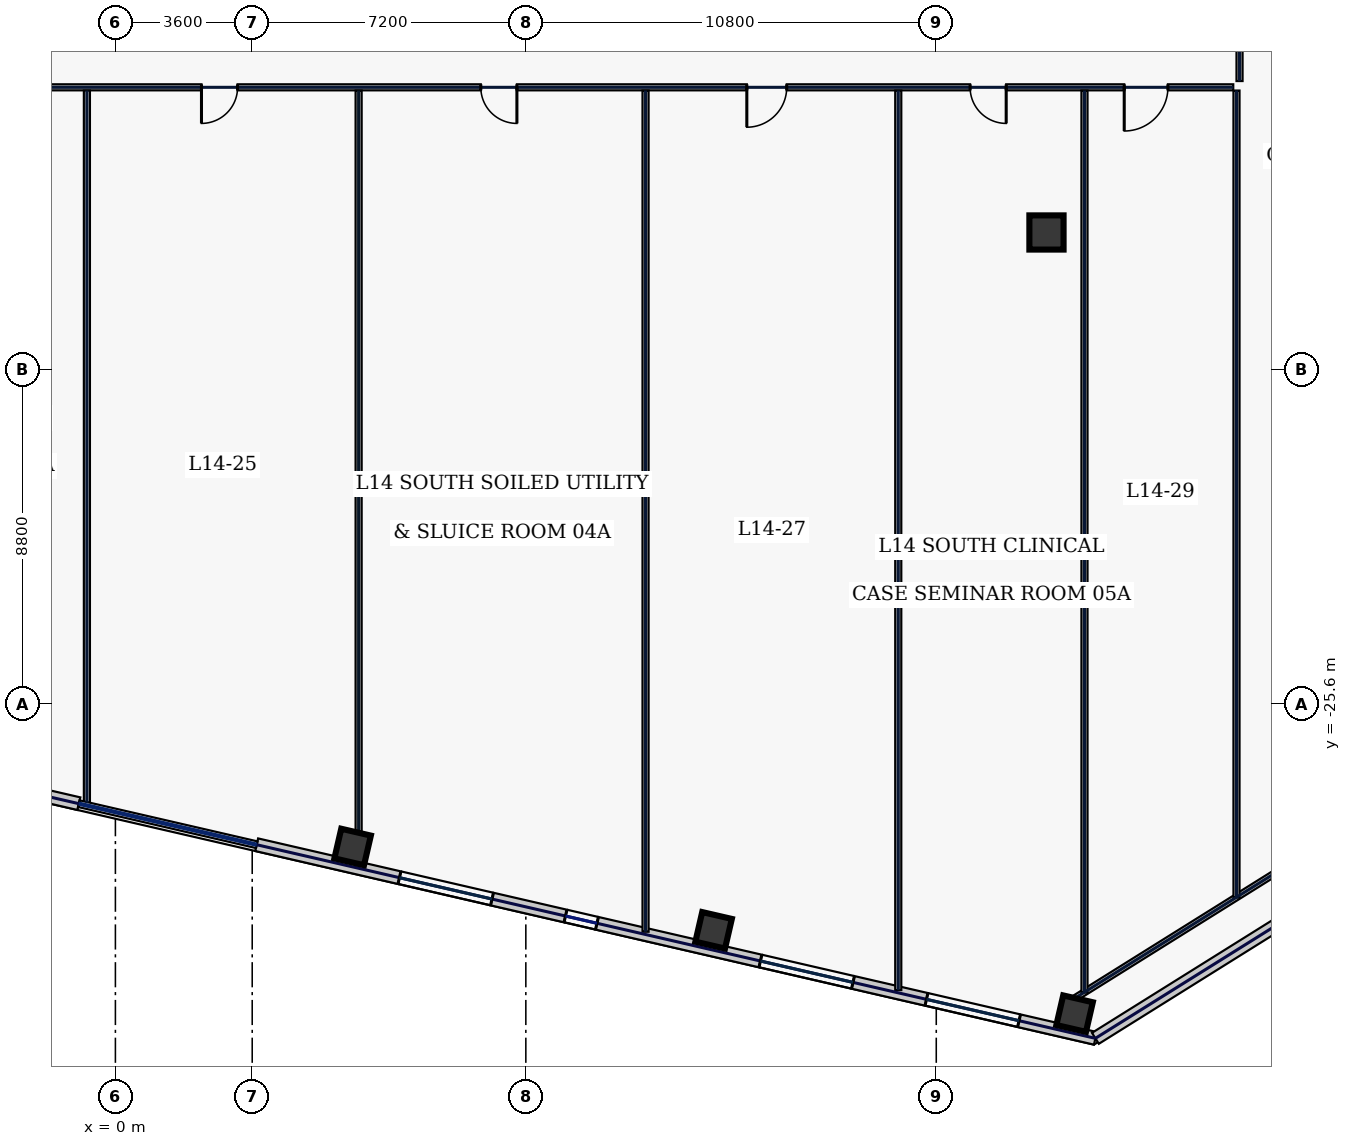
"""IFC4 building model, lengths in metres.
Left out: names, types, materials, properties, quantities, classifications, styles, units other than length and angle.
Written with IfcOpenShell. Run it as: python <this file> out.ifc"""

import sys

from ifc_helpers import new_model, si_unit, direction, frame, frame_2d, origin, origin_2d, place, context, subcontext, project, spatial, rectangle, hollow_rectangle, extrude, element, fill, save


model = new_model("IFC4")
c1 = context("Model", 3, precision=1e-05, world=origin(), true_north=direction((0.0, 1.0)))
c2 = subcontext(c1, "Body", "Model", "MODEL_VIEW")
j1 = project(units=[si_unit("LENGTHUNIT", "METRE"), si_unit("PLANEANGLEUNIT", "RADIAN")], contexts=[c1])
p1 = place(None, origin())
s1 = spatial("IfcSite", under=j1, at=p1, CompositionType="ELEMENT")
p2 = place(p1, origin())
s2 = spatial("IfcBuilding", under=s1, at=p2, CompositionType="ELEMENT")
p3 = place(p2, frame((0.0, 0.0, 67.4)))
s3 = spatial("IfcBuildingStorey", under=s2, at=p3, CompositionType="ELEMENT", Elevation=67.4)
p4 = place(p3, frame((24.5, -13.2, 0.0), z_axis=(0.0, 0.0, 1.0), x_axis=(1.0, 0.0, 0.0)))
e1 = element("IfcColumn", 1, at=p4, inside=s3, PredefinedType="COLUMN", context=c2, shape_type="SweptSolid", body=[
    extrude(hollow_rectangle(XDim=0.9, YDim=0.9, WallThickness=0.04, at=origin_2d()), origin(), (0.0, 0.0, 1.0), 3.74),
])
for number, where, z_axis, x_axis in (
    (2, (6.242, -29.371, 0.0), (0.0, 0.0, 1.0), (0.974, -0.225, 0.0)),
    (3, (15.741, -31.564, 0.0), (0.0, 0.0, 1.0), (0.974, -0.225, 0.0)),
    (4, (25.24, -33.757, 0.0), (0.0, 0.0, 1.0), (0.974, -0.225, 0.0)),
):
    element("IfcColumn", number, at=place(p3, frame(where, z_axis=z_axis, x_axis=x_axis)), inside=s3, PredefinedType="COLUMN", context=c2, shape_type="SweptSolid", body=[
        extrude(hollow_rectangle(XDim=0.8, YDim=0.8, WallThickness=0.036, at=origin_2d()), origin(), (0.0, 0.0, 1.0), 3.74),
    ])
p5 = place(p3, frame((-15.281, -24.925, 0.0), z_axis=(0.0, 0.0, 1.0), x_axis=(0.974370193991, -0.22495049469, 0.0)))
e5 = element("IfcWall", 5, at=p5, inside=s3, PredefinedType="STANDARD", context=c2, shape_type="SweptSolid", body=[
    extrude(rectangle(XDim=14.697, YDim=0.34, at=frame_2d((7.349, 0.0))), origin(), (0.0, 0.0, 1.0), 3.74),
])
p6 = place(p5, frame((4.306, 0.0, 0.22)))
e6 = element("IfcOpeningElement", 6, at=p6, cuts=e5, PredefinedType="OPENING", context=c2, shape_type="SweptSolid", body=[
    extrude(rectangle(XDim=1.6, YDim=1.2, at=frame_2d((0.8, 0.6))), frame((0.0, 0.18, 0.0), z_axis=(0.0, -1.0, 0.0), x_axis=(1.0, 0.0, 0.0)), (0.0, 0.0, 1.0), 0.36),
])
p7 = place(p5, frame((8.341, 0.0, 0.72)))
e7 = element("IfcOpeningElement", 7, at=p7, cuts=e5, PredefinedType="OPENING", context=c2, shape_type="SweptSolid", body=[
    extrude(rectangle(XDim=2.5, YDim=2.15, at=frame_2d((1.25, 1.075))), frame((0.0, 0.18, 0.0), z_axis=(0.0, -1.0, 0.0), x_axis=(1.0, 0.0, 0.0)), (0.0, 0.0, 1.0), 0.36),
])
p8 = place(p3, frame((3.717, -29.311, 0.0), z_axis=(0.0, 0.0, 1.0), x_axis=(0.97436993772, -0.224951604723, 0.0)))
e8 = element("IfcWall", 8, at=p8, inside=s3, PredefinedType="STANDARD", context=c2, shape_type="SweptSolid", body=[
    extrude(rectangle(XDim=22.651, YDim=0.34, at=frame_2d((11.326, 0.0))), origin(), (0.0, 0.0, 1.0), 3.74),
])
p9 = place(p8, frame((3.856, 0.0, 0.72)))
e9 = element("IfcOpeningElement", 9, at=p9, cuts=e8, PredefinedType="OPENING", context=c2, shape_type="SweptSolid", body=[
    extrude(rectangle(XDim=2.5, YDim=2.15, at=frame_2d((1.25, 1.075))), frame((0.0, 0.18, 0.0), z_axis=(0.0, -1.0, 0.0), x_axis=(1.0, 0.0, 0.0)), (0.0, 0.0, 1.0), 0.36),
])
p10 = place(p8, frame((8.341, 0.0, 0.72)))
e10 = element("IfcOpeningElement", 10, at=p10, cuts=e8, PredefinedType="OPENING", context=c2, shape_type="SweptSolid", body=[
    extrude(rectangle(XDim=0.85, YDim=1.85, at=frame_2d((0.425, 0.925))), frame((0.0, 0.18, 0.0), z_axis=(0.0, -1.0, 0.0), x_axis=(1.0, 0.0, 0.0)), (0.0, 0.0, 1.0), 0.36),
])
p11 = place(p8, frame((13.605, 0.0, 0.72)))
e11 = element("IfcOpeningElement", 11, at=p11, cuts=e8, PredefinedType="OPENING", context=c2, shape_type="SweptSolid", body=[
    extrude(rectangle(XDim=2.5, YDim=2.15, at=frame_2d((1.25, 1.075))), frame((0.0, 0.18, 0.0), z_axis=(0.0, -1.0, 0.0), x_axis=(1.0, 0.0, 0.0)), (0.0, 0.0, 1.0), 0.36),
])
p12 = place(p8, frame((18.089, 0.0, 0.72)))
e12 = element("IfcOpeningElement", 12, at=p12, cuts=e8, PredefinedType="OPENING", context=c2, shape_type="SweptSolid", body=[
    extrude(rectangle(XDim=2.5, YDim=2.15, at=frame_2d((1.25, 1.075))), frame((0.0, 0.18, 0.0), z_axis=(0.0, -1.0, 0.0), x_axis=(1.0, 0.0, 0.0)), (0.0, 0.0, 1.0), 0.36),
])
p13 = place(p3, frame((25.788, -34.406, 0.0), z_axis=(0.0, 0.0, 1.0), x_axis=(0.848046504656, 0.529921811158, 0.0)))
e13 = element("IfcWall", 13, at=p13, inside=s3, PredefinedType="STANDARD", context=c2, shape_type="SweptSolid", body=[
    extrude(rectangle(XDim=7.113, YDim=0.34, at=frame_2d((3.557, 0.0))), origin(), (0.0, 0.0, 1.0), 3.74),
])
p14 = place(p3, frame((25.06, -33.468, 0.0), z_axis=(0.0, 0.0, 1.0), x_axis=(0.848043064089, 0.529927317139, 0.0)))
e14 = element("IfcWall", 14, at=p14, inside=s3, PredefinedType="PARTITIONING", context=c2, shape_type="SweptSolid", body=[
    extrude(rectangle(XDim=7.354, YDim=0.16, at=frame_2d((3.677, 0.0))), origin(), (0.0, 0.0, 1.0), 3.74),
])
p15 = place(p3, frame((29.58, 9.415, 0.0), z_axis=(0.0, 0.0, 1.0), x_axis=(0.0, -1.0, 0.0)))
e15 = element("IfcWall", 15, at=p15, inside=s3, PredefinedType="PARTITIONING", context=c2, shape_type="SweptSolid", body=[
    extrude(rectangle(XDim=18.63, YDim=0.16, at=frame_2d((9.315, 0.0))), origin(), (0.0, 0.0, 1.0), 3.74),
])
p16 = place(p15, frame((16.081, 0.0, 0.0)))
e16 = element("IfcOpeningElement", 16, at=p16, cuts=e15, PredefinedType="OPENING", context=c2, shape_type="SweptSolid", body=[
    extrude(rectangle(XDim=0.95, YDim=2.2, at=frame_2d((0.475, 1.1))), frame((0.0, 0.09, 0.0), z_axis=(0.0, -1.0, 0.0), x_axis=(1.0, 0.0, 0.0)), (0.0, 0.0, 1.0), 0.18),
])
p17 = place(p15, frame((11.0, 0.0, 0.0)))
e17 = element("IfcOpeningElement", 17, at=p17, cuts=e15, PredefinedType="OPENING", context=c2, shape_type="SweptSolid", body=[
    extrude(rectangle(XDim=0.95, YDim=2.2, at=frame_2d((0.475, 1.1))), frame((0.0, 0.09, 0.0), z_axis=(0.0, -1.0, 0.0), x_axis=(1.0, 0.0, 0.0)), (0.0, 0.0, 1.0), 0.18),
])
p18 = place(p15, frame((5.8, 0.0, 0.0)))
e18 = element("IfcOpeningElement", 18, at=p18, cuts=e15, PredefinedType="OPENING", context=c2, shape_type="SweptSolid", body=[
    extrude(rectangle(XDim=0.95, YDim=2.2, at=frame_2d((0.475, 1.1))), frame((0.0, 0.09, 0.0), z_axis=(0.0, -1.0, 0.0), x_axis=(1.0, 0.0, 0.0)), (0.0, 0.0, 1.0), 0.18),
])
p19 = place(p15, frame((1.869, 0.0, 0.0)))
e19 = element("IfcOpeningElement", 19, at=p19, cuts=e15, PredefinedType="OPENING", context=c2, shape_type="SweptSolid", body=[
    extrude(rectangle(XDim=0.95, YDim=2.2, at=frame_2d((0.475, 1.1))), frame((0.0, 0.09, 0.0), z_axis=(0.0, -1.0, 0.0), x_axis=(1.0, 0.0, 0.0)), (0.0, 0.0, 1.0), 0.18),
])
p20 = place(p3, frame((29.415, -9.38, 0.0), z_axis=(0.0, 0.0, 1.0), x_axis=(-1.0, 0.0, 0.0)))
e20 = element("IfcWall", 20, at=p20, inside=s3, PredefinedType="PARTITIONING", context=c2, shape_type="SweptSolid", body=[
    extrude(rectangle(XDim=58.83, YDim=0.16, at=frame_2d((29.415, 0.0))), origin(), (0.0, 0.0, 1.0), 3.74),
])
p21 = place(p20, frame((54.781, 0.0, 0.0)))
e21 = element("IfcOpeningElement", 21, at=p21, cuts=e20, PredefinedType="OPENING", context=c2, shape_type="SweptSolid", body=[
    extrude(rectangle(XDim=0.95, YDim=2.2, at=frame_2d((0.475, 1.1))), frame((0.0, 0.09, 0.0), z_axis=(0.0, -1.0, 0.0), x_axis=(1.0, 0.0, 0.0)), (0.0, 0.0, 1.0), 0.18),
])
p22 = place(p20, frame((47.625, 0.0, 0.0)))
e22 = element("IfcOpeningElement", 22, at=p22, cuts=e20, PredefinedType="OPENING", context=c2, shape_type="SweptSolid", body=[
    extrude(rectangle(XDim=1.3, YDim=2.2, at=frame_2d((0.65, 1.1))), frame((0.0, 0.09, 0.0), z_axis=(0.0, -1.0, 0.0), x_axis=(1.0, 0.0, 0.0)), (0.0, 0.0, 1.0), 0.18),
])
p23 = place(p20, frame((40.825, 0.0, 0.0)))
e23 = element("IfcOpeningElement", 23, at=p23, cuts=e20, PredefinedType="OPENING", context=c2, shape_type="SweptSolid", body=[
    extrude(rectangle(XDim=1.45, YDim=2.2, at=frame_2d((0.725, 1.1))), frame((0.0, 0.09, 0.0), z_axis=(0.0, -1.0, 0.0), x_axis=(1.0, 0.0, 0.0)), (0.0, 0.0, 1.0), 0.18),
])
p24 = place(p20, frame((33.625, 0.0, 0.0)))
e24 = element("IfcOpeningElement", 24, at=p24, cuts=e20, PredefinedType="OPENING", context=c2, shape_type="SweptSolid", body=[
    extrude(rectangle(XDim=1.3, YDim=2.2, at=frame_2d((0.65, 1.1))), frame((0.0, 0.09, 0.0), z_axis=(0.0, -1.0, 0.0), x_axis=(1.0, 0.0, 0.0)), (0.0, 0.0, 1.0), 0.18),
])
p25 = place(p20, frame((26.2, 0.0, 0.0)))
e25 = element("IfcOpeningElement", 25, at=p25, cuts=e20, PredefinedType="OPENING", context=c2, shape_type="SweptSolid", body=[
    extrude(rectangle(XDim=0.95, YDim=2.2, at=frame_2d((0.475, 1.1))), frame((0.0, 0.09, 0.0), z_axis=(0.0, -1.0, 0.0), x_axis=(1.0, 0.0, 0.0)), (0.0, 0.0, 1.0), 0.18),
])
p26 = place(p20, frame((18.85, 0.0, 0.0)))
e26 = element("IfcOpeningElement", 26, at=p26, cuts=e20, PredefinedType="OPENING", context=c2, shape_type="SweptSolid", body=[
    extrude(rectangle(XDim=0.95, YDim=2.2, at=frame_2d((0.475, 1.1))), frame((0.0, 0.09, 0.0), z_axis=(0.0, -1.0, 0.0), x_axis=(1.0, 0.0, 0.0)), (0.0, 0.0, 1.0), 0.18),
])
p27 = place(p20, frame((11.75, 0.0, 0.0)))
e27 = element("IfcOpeningElement", 27, at=p27, cuts=e20, PredefinedType="OPENING", context=c2, shape_type="SweptSolid", body=[
    extrude(rectangle(XDim=1.05, YDim=2.2, at=frame_2d((0.525, 1.1))), frame((0.0, 0.09, 0.0), z_axis=(0.0, -1.0, 0.0), x_axis=(1.0, 0.0, 0.0)), (0.0, 0.0, 1.0), 0.18),
])
p28 = place(p20, frame((5.975, 0.0, 0.0)))
e28 = element("IfcOpeningElement", 28, at=p28, cuts=e20, PredefinedType="OPENING", context=c2, shape_type="SweptSolid", body=[
    extrude(rectangle(XDim=0.95, YDim=2.2, at=frame_2d((0.475, 1.1))), frame((0.0, 0.09, 0.0), z_axis=(0.0, -1.0, 0.0), x_axis=(1.0, 0.0, 0.0)), (0.0, 0.0, 1.0), 0.18),
])
p29 = place(p20, frame((1.719, 0.0, 0.0)))
e29 = element("IfcOpeningElement", 29, at=p29, cuts=e20, PredefinedType="OPENING", context=c2, shape_type="SweptSolid", body=[
    extrude(rectangle(XDim=1.15, YDim=2.2, at=frame_2d((0.575, 1.1))), frame((0.0, 0.09, 0.0), z_axis=(0.0, -1.0, 0.0), x_axis=(1.0, 0.0, 0.0)), (0.0, 0.0, 1.0), 0.18),
])
p30 = place(p3, frame((29.5, -30.703, 0.0), z_axis=(0.0, 0.0, 1.0), x_axis=(0.0, 1.0, 0.0)))
e30 = element("IfcWall", 30, at=p30, inside=s3, PredefinedType="PARTITIONING", context=c2, shape_type="SweptSolid", body=[
    extrude(rectangle(XDim=21.238, YDim=0.16, at=frame_2d((10.619, 0.0))), origin(), (0.0, 0.0, 1.0), 3.74),
])
p31 = place(p3, frame((6.4, -29.859, 0.0), z_axis=(0.0, 0.0, 1.0), x_axis=(0.0, 1.0, 0.0)))
e31 = element("IfcWall", 31, at=p31, inside=s3, PredefinedType="PARTITIONING", context=c2, shape_type="SweptSolid", body=[
    extrude(rectangle(XDim=20.394, YDim=0.16, at=frame_2d((10.197, 0.0))), origin(), (0.0, 0.0, 1.0), 3.235),
])
p32 = place(p3, frame((20.6, -33.137, 0.0), z_axis=(0.0, 0.0, 1.0), x_axis=(0.0, 1.0, 0.0)))
e32 = element("IfcWall", 32, at=p32, inside=s3, PredefinedType="PARTITIONING", context=c2, shape_type="SweptSolid", body=[
    extrude(rectangle(XDim=23.672, YDim=0.16, at=frame_2d((11.836, 0.0))), origin(), (0.0, 0.0, 1.0), 3.74),
])
p33 = place(p3, frame((-0.75, -28.208, 0.0), z_axis=(0.0, 0.0, 1.0), x_axis=(0.0, 1.0, 0.0)))
e33 = element("IfcWall", 33, at=p33, inside=s3, PredefinedType="PARTITIONING", context=c2, shape_type="SweptSolid", body=[
    extrude(rectangle(XDim=18.743, YDim=0.16, at=frame_2d((9.372, 0.0))), origin(), (0.0, 0.0, 1.0), 3.74),
])
p34 = place(p3, frame((13.95, -31.602, 0.0), z_axis=(0.0, 0.0, 1.0), x_axis=(0.0, 1.0, 0.0)))
e34 = element("IfcWall", 34, at=p34, inside=s3, PredefinedType="PARTITIONING", context=c2, shape_type="SweptSolid", body=[
    extrude(rectangle(XDim=22.137, YDim=0.16, at=frame_2d((11.068, 0.0))), origin(), (0.0, 0.0, 1.0), 3.74),
])
p35 = place(p3, frame((25.5, -33.202, 0.0), z_axis=(0.0, 0.0, 1.0), x_axis=(0.0, 1.0, 0.0)))
e35 = element("IfcWall", 35, at=p35, inside=s3, PredefinedType="PARTITIONING", context=c2, shape_type="SweptSolid", body=[
    extrude(rectangle(XDim=23.737, YDim=0.16, at=frame_2d((11.869, 0.0))), origin(), (0.0, 0.0, 1.0), 3.74),
])
p36 = place(p9, origin())
e36 = element("IfcWindow", 36, at=p36, inside=s3, PartitioningType="SINGLE_PANEL", PredefinedType="WINDOW", context=c2, shape_type="SweptSolid", body=[
    extrude(rectangle(XDim=2.5, YDim=2.15, at=frame_2d((1.25, 1.075))), frame((0.0, 0.03, 0.0), z_axis=(0.0, -1.0, 0.0), x_axis=(1.0, 0.0, 0.0)), (0.0, 0.0, 1.0), 0.06),
])
fill(e9, e36)
p37 = place(p10, origin())
e37 = element("IfcWindow", 37, at=p37, inside=s3, PartitioningType="SINGLE_PANEL", PredefinedType="WINDOW", context=c2, shape_type="SweptSolid", body=[
    extrude(rectangle(XDim=0.85, YDim=1.85, at=frame_2d((0.425, 0.925))), frame((0.0, 0.03, 0.0), z_axis=(0.0, -1.0, 0.0), x_axis=(1.0, 0.0, 0.0)), (0.0, 0.0, 1.0), 0.06),
])
fill(e10, e37)
p38 = place(p11, origin())
e38 = element("IfcWindow", 38, at=p38, inside=s3, PartitioningType="SINGLE_PANEL", PredefinedType="WINDOW", context=c2, shape_type="SweptSolid", body=[
    extrude(rectangle(XDim=2.5, YDim=2.15, at=frame_2d((1.25, 1.075))), frame((0.0, 0.03, 0.0), z_axis=(0.0, -1.0, 0.0), x_axis=(1.0, 0.0, 0.0)), (0.0, 0.0, 1.0), 0.06),
])
fill(e11, e38)
p39 = place(p12, origin())
e39 = element("IfcWindow", 39, at=p39, inside=s3, PartitioningType="SINGLE_PANEL", PredefinedType="WINDOW", context=c2, shape_type="SweptSolid", body=[
    extrude(rectangle(XDim=2.5, YDim=2.15, at=frame_2d((1.25, 1.075))), frame((0.0, 0.03, 0.0), z_axis=(0.0, -1.0, 0.0), x_axis=(1.0, 0.0, 0.0)), (0.0, 0.0, 1.0), 0.06),
])
fill(e12, e39)
p40 = place(p25, origin())
e40 = element("IfcDoor", 40, at=p40, inside=s3, OperationType="SINGLE_SWING_RIGHT", PredefinedType="DOOR", context=c2, shape_type="SweptSolid", body=[
    extrude(rectangle(XDim=0.95, YDim=2.2, at=frame_2d((0.475, 1.1))), frame((0.0, 0.025, 0.0), z_axis=(0.0, -1.0, 0.0), x_axis=(1.0, 0.0, 0.0)), (0.0, 0.0, 1.0), 0.05),
])
fill(e25, e40)
p41 = place(p26, origin())
e41 = element("IfcDoor", 41, at=p41, inside=s3, OperationType="SINGLE_SWING_LEFT", PredefinedType="DOOR", context=c2, shape_type="SweptSolid", body=[
    extrude(rectangle(XDim=0.95, YDim=2.2, at=frame_2d((0.475, 1.1))), frame((0.0, 0.025, 0.0), z_axis=(0.0, -1.0, 0.0), x_axis=(1.0, 0.0, 0.0)), (0.0, 0.0, 1.0), 0.05),
])
fill(e26, e41)
p42 = place(p27, origin())
e42 = element("IfcDoor", 42, at=p42, inside=s3, OperationType="SINGLE_SWING_RIGHT", PredefinedType="DOOR", context=c2, shape_type="SweptSolid", body=[
    extrude(rectangle(XDim=1.05, YDim=2.2, at=frame_2d((0.525, 1.1))), frame((0.0, 0.025, 0.0), z_axis=(0.0, -1.0, 0.0), x_axis=(1.0, 0.0, 0.0)), (0.0, 0.0, 1.0), 0.05),
])
fill(e27, e42)
p43 = place(p28, origin())
e43 = element("IfcDoor", 43, at=p43, inside=s3, OperationType="SINGLE_SWING_LEFT", PredefinedType="DOOR", context=c2, shape_type="SweptSolid", body=[
    extrude(rectangle(XDim=0.95, YDim=2.2, at=frame_2d((0.475, 1.1))), frame((0.0, 0.025, 0.0), z_axis=(0.0, -1.0, 0.0), x_axis=(1.0, 0.0, 0.0)), (0.0, 0.0, 1.0), 0.05),
])
fill(e28, e43)
p44 = place(p29, origin())
e44 = element("IfcDoor", 44, at=p44, inside=s3, OperationType="SINGLE_SWING_RIGHT", PredefinedType="DOOR", context=c2, shape_type="SweptSolid", body=[
    extrude(rectangle(XDim=1.15, YDim=2.2, at=frame_2d((0.575, 1.1))), frame((0.0, 0.025, 0.0), z_axis=(0.0, -1.0, 0.0), x_axis=(1.0, 0.0, 0.0)), (0.0, 0.0, 1.0), 0.05),
])
fill(e29, e44)
save(model, sys.argv[1])
